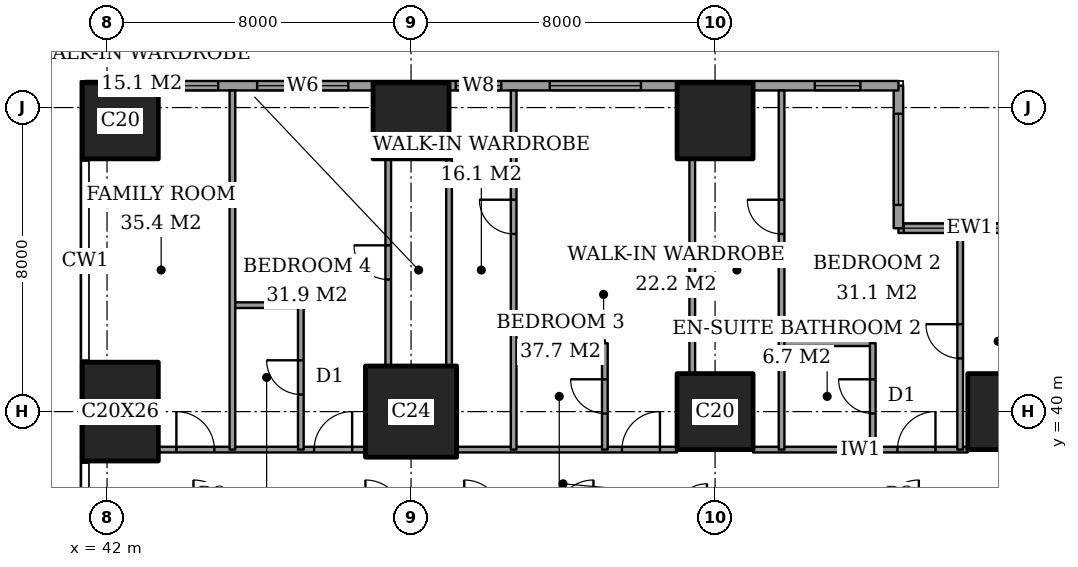
"""IFC4 building model, lengths in metres.
Left out: names, types, materials, properties, quantities, classifications, styles, units other than length and angle.
Written with IfcOpenShell. Run it as: python <this file> out.ifc"""

import sys

from ifc_helpers import new_model, si_unit, direction, frame, frame_2d, origin, origin_2d, place, context, subcontext, project, spatial, rectangle, extrude, element, fill, save


model = new_model("IFC4")
c1 = context("Model", 3, precision=1e-05, world=origin(), true_north=direction((0.0, 1.0)))
c2 = subcontext(c1, "Body", "Model", "MODEL_VIEW")
j1 = project(units=[si_unit("LENGTHUNIT", "METRE"), si_unit("PLANEANGLEUNIT", "RADIAN")], contexts=[c1])
p1 = place(None, origin())
s1 = spatial("IfcSite", under=j1, at=p1, CompositionType="ELEMENT")
p2 = place(p1, origin())
s2 = spatial("IfcBuilding", under=s1, at=p2, CompositionType="ELEMENT")
p3 = place(p2, frame((0.0, 0.0, 58.4)))
s3 = spatial("IfcBuildingStorey", under=s2, at=p3, CompositionType="ELEMENT", Elevation=58.4)
p4 = place(p3, frame((42.35, 40.0, 0.0), z_axis=(0.0, 0.0, 1.0), x_axis=(1.0, 0.0, 0.0)))
e1 = element("IfcColumn", 1, at=p4, inside=s3, PredefinedType="COLUMN", context=c2, shape_type="SweptSolid", body=[
    extrude(rectangle(XDim=2.0, YDim=2.6, at=origin_2d()), origin(), (0.0, 0.0, 1.0), 3.6),
])
p5 = place(p3, frame((42.35, 47.65, 0.0), z_axis=(0.0, 0.0, 1.0), x_axis=(1.0, 0.0, 0.0)))
e2 = element("IfcColumn", 2, at=p5, inside=s3, PredefinedType="COLUMN", context=c2, shape_type="SweptSolid", body=[
    extrude(rectangle(XDim=2.0, YDim=2.0, at=origin_2d()), origin(), (0.0, 0.0, 1.0), 3.6),
])
p6 = place(p3, frame((50.0, 40.0, 0.0), z_axis=(0.0, 0.0, 1.0), x_axis=(1.0, 0.0, 0.0)))
e3 = element("IfcColumn", 3, at=p6, inside=s3, PredefinedType="COLUMN", context=c2, shape_type="SweptSolid", body=[
    extrude(rectangle(XDim=2.4, YDim=2.4, at=origin_2d()), origin(), (0.0, 0.0, 1.0), 3.6),
])
for number, where, z_axis, x_axis in (
    (4, (50.0, 47.65, 0.0), (0.0, 0.0, 1.0), (1.0, 0.0, 0.0)),
    (5, (58.0, 40.0, 0.0), (0.0, 0.0, 1.0), (1.0, 0.0, 0.0)),
    (6, (58.0, 47.65, 0.0), (0.0, 0.0, 1.0), (1.0, 0.0, 0.0)),
    (7, (65.65, 40.0, 0.0), (0.0, 0.0, 1.0), (1.0, 0.0, 0.0)),
):
    element("IfcColumn", number, at=place(p3, frame(where, z_axis=z_axis, x_axis=x_axis)), inside=s3, PredefinedType="COLUMN", context=c2, shape_type="SweptSolid", body=[
        extrude(rectangle(XDim=2.0, YDim=2.0, at=origin_2d()), origin(), (0.0, 0.0, 1.0), 3.6),
    ])
p7 = place(p3, frame((66.575, 44.825, 0.0), z_axis=(0.0, 0.0, 1.0), x_axis=(-1.0, 0.0, 0.0)))
e8 = element("IfcWall", 8, at=p7, inside=s3, PredefinedType="SOLIDWALL", context=c2, shape_type="SweptSolid", body=[
    extrude(rectangle(XDim=3.75, YDim=0.25, at=frame_2d((1.875, 0.0))), origin(), (0.0, 0.0, 1.0), 3.6),
])
p8 = place(p7, frame((0.525, 0.0, 0.6)))
e9 = element("IfcOpeningElement", 9, at=p8, cuts=e8, PredefinedType="OPENING", context=c2, shape_type="SweptSolid", body=[
    extrude(rectangle(XDim=1.2, YDim=2.0, at=frame_2d((0.6, 1.0))), frame((0.0, 0.135, 0.0), z_axis=(0.0, -1.0, 0.0), x_axis=(1.0, 0.0, 0.0)), (0.0, 0.0, 1.0), 0.27),
])
p9 = place(p7, frame((2.413, 0.0, 0.6)))
e10 = element("IfcOpeningElement", 10, at=p9, cuts=e8, PredefinedType="OPENING", context=c2, shape_type="SweptSolid", body=[
    extrude(rectangle(XDim=1.2, YDim=2.0, at=frame_2d((0.6, 1.0))), frame((0.0, 0.135, 0.0), z_axis=(0.0, -1.0, 0.0), x_axis=(1.0, 0.0, 0.0)), (0.0, 0.0, 1.0), 0.27),
])
p10 = place(p3, frame((62.825, 44.825, 0.0), z_axis=(0.0, 0.0, 1.0), x_axis=(0.0, 1.0, 0.0)))
e11 = element("IfcWall", 11, at=p10, inside=s3, PredefinedType="SOLIDWALL", context=c2, shape_type="SweptSolid", body=[
    extrude(rectangle(XDim=3.75, YDim=0.25, at=frame_2d((1.875, 0.0))), origin(), (0.0, 0.0, 1.0), 3.6),
])
p11 = place(p10, frame((0.613, 0.0, 0.6)))
e12 = element("IfcOpeningElement", 12, at=p11, cuts=e11, PredefinedType="OPENING", context=c2, shape_type="SweptSolid", body=[
    extrude(rectangle(XDim=2.4, YDim=2.0, at=frame_2d((1.2, 1.0))), frame((0.0, 0.135, 0.0), z_axis=(0.0, -1.0, 0.0), x_axis=(1.0, 0.0, 0.0)), (0.0, 0.0, 1.0), 0.27),
])
p12 = place(p3, frame((62.825, 48.575, 0.0), z_axis=(0.0, 0.0, 1.0), x_axis=(-1.0, 0.0, 0.0)))
e13 = element("IfcWall", 13, at=p12, inside=s3, PredefinedType="SOLIDWALL", context=c2, shape_type="SweptSolid", body=[
    extrude(rectangle(XDim=21.4, YDim=0.25, at=frame_2d((10.7, 0.0))), origin(), (0.0, 0.0, 1.0), 3.6),
])
p13 = place(p12, frame((1.0, 0.0, 0.6)))
e14 = element("IfcOpeningElement", 14, at=p13, cuts=e13, PredefinedType="OPENING", context=c2, shape_type="SweptSolid", body=[
    extrude(rectangle(XDim=1.2, YDim=2.0, at=frame_2d((0.6, 1.0))), frame((0.0, 0.135, 0.0), z_axis=(0.0, -1.0, 0.0), x_axis=(1.0, 0.0, 0.0)), (0.0, 0.0, 1.0), 0.27),
])
p14 = place(p12, frame((6.775, 0.0, 0.6)))
e15 = element("IfcOpeningElement", 15, at=p14, cuts=e13, PredefinedType="OPENING", context=c2, shape_type="SweptSolid", body=[
    extrude(rectangle(XDim=2.4, YDim=2.0, at=frame_2d((1.2, 1.0))), frame((0.0, 0.135, 0.0), z_axis=(0.0, -1.0, 0.0), x_axis=(1.0, 0.0, 0.0)), (0.0, 0.0, 1.0), 0.27),
])
p15 = place(p12, frame((10.45, 0.0, 0.6)))
e16 = element("IfcOpeningElement", 16, at=p15, cuts=e13, PredefinedType="OPENING", context=c2, shape_type="SweptSolid", body=[
    extrude(rectangle(XDim=1.2, YDim=2.0, at=frame_2d((0.6, 1.0))), frame((0.0, 0.135, 0.0), z_axis=(0.0, -1.0, 0.0), x_axis=(1.0, 0.0, 0.0)), (0.0, 0.0, 1.0), 0.27),
])
p16 = place(p12, frame((14.475, 0.0, 0.6)))
e17 = element("IfcOpeningElement", 17, at=p16, cuts=e13, PredefinedType="OPENING", context=c2, shape_type="SweptSolid", body=[
    extrude(rectangle(XDim=2.4, YDim=2.0, at=frame_2d((1.2, 1.0))), frame((0.0, 0.135, 0.0), z_axis=(0.0, -1.0, 0.0), x_axis=(1.0, 0.0, 0.0)), (0.0, 0.0, 1.0), 0.27),
])
p17 = place(p12, frame((17.9, 0.0, 0.6)))
e18 = element("IfcOpeningElement", 18, at=p17, cuts=e13, PredefinedType="OPENING", context=c2, shape_type="SweptSolid", body=[
    extrude(rectangle(XDim=1.2, YDim=2.0, at=frame_2d((0.6, 1.0))), frame((0.0, 0.135, 0.0), z_axis=(0.0, -1.0, 0.0), x_axis=(1.0, 0.0, 0.0)), (0.0, 0.0, 1.0), 0.27),
])
p18 = place(p3, frame((43.35, 39.0, 0.0), z_axis=(0.0, 0.0, 1.0), x_axis=(1.0, 0.0, 0.0)))
e19 = element("IfcWall", 19, at=p18, inside=s3, PredefinedType="PARTITIONING", context=c2, shape_type="SweptSolid", body=[
    extrude(rectangle(XDim=5.45, YDim=0.15, at=frame_2d((2.725, 0.0))), origin(), (0.0, 0.0, 1.0), 3.35),
])
p19 = place(p18, frame((4.1, 0.0, 0.0)))
e20 = element("IfcOpeningElement", 20, at=p19, cuts=e19, PredefinedType="OPENING", context=c2, shape_type="SweptSolid", body=[
    extrude(rectangle(XDim=1.0, YDim=2.1, at=frame_2d((0.5, 1.05))), frame((0.0, 0.085, 0.0), z_axis=(0.0, -1.0, 0.0), x_axis=(1.0, 0.0, 0.0)), (0.0, 0.0, 1.0), 0.17),
])
p20 = place(p18, frame((0.475, 0.0, 0.0)))
e21 = element("IfcOpeningElement", 21, at=p20, cuts=e19, PredefinedType="OPENING", context=c2, shape_type="SweptSolid", body=[
    extrude(rectangle(XDim=1.0, YDim=2.1, at=frame_2d((0.5, 1.05))), frame((0.0, 0.085, 0.0), z_axis=(0.0, -1.0, 0.0), x_axis=(1.0, 0.0, 0.0)), (0.0, 0.0, 1.0), 0.17),
])
p21 = place(p3, frame((51.2, 39.0, 0.0), z_axis=(0.0, 0.0, 1.0), x_axis=(1.0, 0.0, 0.0)))
e22 = element("IfcWall", 22, at=p21, inside=s3, PredefinedType="PARTITIONING", context=c2, shape_type="SweptSolid", body=[
    extrude(rectangle(XDim=5.8, YDim=0.15, at=frame_2d((2.9, 0.0))), origin(), (0.0, 0.0, 1.0), 3.35),
])
p22 = place(p21, frame((4.35, 0.0, 0.0)))
e23 = element("IfcOpeningElement", 23, at=p22, cuts=e22, PredefinedType="OPENING", context=c2, shape_type="SweptSolid", body=[
    extrude(rectangle(XDim=1.0, YDim=2.1, at=frame_2d((0.5, 1.05))), frame((0.0, 0.085, 0.0), z_axis=(0.0, -1.0, 0.0), x_axis=(1.0, 0.0, 0.0)), (0.0, 0.0, 1.0), 0.17),
])
p23 = place(p3, frame((59.0, 39.0, 0.0), z_axis=(0.0, 0.0, 1.0), x_axis=(1.0, 0.0, 0.0)))
e24 = element("IfcWall", 24, at=p23, inside=s3, PredefinedType="PARTITIONING", context=c2, shape_type="SweptSolid", body=[
    extrude(rectangle(XDim=5.65, YDim=0.15, at=frame_2d((2.825, 0.0))), origin(), (0.0, 0.0, 1.0), 3.35),
])
p24 = place(p23, frame((3.8, 0.0, 0.0)))
e25 = element("IfcOpeningElement", 25, at=p24, cuts=e24, PredefinedType="OPENING", context=c2, shape_type="SweptSolid", body=[
    extrude(rectangle(XDim=1.0, YDim=2.1, at=frame_2d((0.5, 1.05))), frame((0.0, 0.085, 0.0), z_axis=(0.0, -1.0, 0.0), x_axis=(1.0, 0.0, 0.0)), (0.0, 0.0, 1.0), 0.17),
])
p25 = place(p3, frame((52.7, 41.8, 0.0), z_axis=(0.0, 0.0, 1.0), x_axis=(1.0, 0.0, 0.0)))
e26 = element("IfcWall", 26, at=p25, inside=s3, PredefinedType="PARTITIONING", context=c2, shape_type="SweptSolid", body=[
    extrude(rectangle(XDim=2.4, YDim=0.15, at=frame_2d((1.2, 0.0))), origin(), (0.0, 0.0, 1.0), 3.35),
])
p26 = place(p3, frame((59.75, 41.8, 0.0), z_axis=(0.0, 0.0, 1.0), x_axis=(1.0, 0.0, 0.0)))
e27 = element("IfcWall", 27, at=p26, inside=s3, PredefinedType="PARTITIONING", context=c2, shape_type="SweptSolid", body=[
    extrude(rectangle(XDim=2.4, YDim=0.15, at=frame_2d((1.2, 0.0))), origin(), (0.0, 0.0, 1.0), 3.35),
])
p27 = place(p3, frame((45.3, 42.8, 0.0), z_axis=(0.0, 0.0, 1.0), x_axis=(1.0, 0.0, 0.0)))
e28 = element("IfcWall", 28, at=p27, inside=s3, PredefinedType="PARTITIONING", context=c2, shape_type="SweptSolid", body=[
    extrude(rectangle(XDim=1.8, YDim=0.15, at=frame_2d((0.9, 0.0))), origin(), (0.0, 0.0, 1.0), 3.35),
])
p28 = place(p3, frame((45.3, 39.0, 0.0), z_axis=(0.0, 0.0, 1.0), x_axis=(0.0, 1.0, 0.0)))
e29 = element("IfcWall", 29, at=p28, inside=s3, PredefinedType="PARTITIONING", context=c2, shape_type="SweptSolid", body=[
    extrude(rectangle(XDim=9.45, YDim=0.15, at=frame_2d((4.725, 0.0))), origin(), (0.0, 0.0, 1.0), 3.35),
])
p29 = place(p3, frame((47.1, 39.0, 0.0), z_axis=(0.0, 0.0, 1.0), x_axis=(0.0, 1.0, 0.0)))
e30 = element("IfcWall", 30, at=p29, inside=s3, PredefinedType="PARTITIONING", context=c2, shape_type="SweptSolid", body=[
    extrude(rectangle(XDim=3.8, YDim=0.15, at=frame_2d((1.9, 0.0))), origin(), (0.0, 0.0, 1.0), 3.35),
])
p30 = place(p29, frame((1.45, 0.0, 0.0)))
e31 = element("IfcOpeningElement", 31, at=p30, cuts=e30, PredefinedType="OPENING", context=c2, shape_type="SweptSolid", body=[
    extrude(rectangle(XDim=0.9, YDim=2.1, at=frame_2d((0.45, 1.05))), frame((0.0, 0.085, 0.0), z_axis=(0.0, -1.0, 0.0), x_axis=(1.0, 0.0, 0.0)), (0.0, 0.0, 1.0), 0.17),
])
p31 = place(p3, frame((49.4, 41.2, 0.0), z_axis=(0.0, 0.0, 1.0), x_axis=(0.0, 1.0, 0.0)))
e32 = element("IfcWall", 32, at=p31, inside=s3, PredefinedType="PARTITIONING", context=c2, shape_type="SweptSolid", body=[
    extrude(rectangle(XDim=5.45, YDim=0.15, at=frame_2d((2.725, 0.0))), origin(), (0.0, 0.0, 1.0), 3.35),
])
p32 = place(p31, frame((2.275, 0.0, 0.0)))
e33 = element("IfcOpeningElement", 33, at=p32, cuts=e32, PredefinedType="OPENING", context=c2, shape_type="SweptSolid", body=[
    extrude(rectangle(XDim=0.9, YDim=2.1, at=frame_2d((0.45, 1.05))), frame((0.0, 0.085, 0.0), z_axis=(0.0, -1.0, 0.0), x_axis=(1.0, 0.0, 0.0)), (0.0, 0.0, 1.0), 0.17),
])
p33 = place(p3, frame((51.0, 41.2, 0.0), z_axis=(0.0, 0.0, 1.0), x_axis=(0.0, 1.0, 0.0)))
e34 = element("IfcWall", 34, at=p33, inside=s3, PredefinedType="PARTITIONING", context=c2, shape_type="SweptSolid", body=[
    extrude(rectangle(XDim=5.45, YDim=0.15, at=frame_2d((2.725, 0.0))), origin(), (0.0, 0.0, 1.0), 3.35),
])
p34 = place(p3, frame((52.7, 39.0, 0.0), z_axis=(0.0, 0.0, 1.0), x_axis=(0.0, 1.0, 0.0)))
e35 = element("IfcWall", 35, at=p34, inside=s3, PredefinedType="PARTITIONING", context=c2, shape_type="SweptSolid", body=[
    extrude(rectangle(XDim=9.45, YDim=0.15, at=frame_2d((4.725, 0.0))), origin(), (0.0, 0.0, 1.0), 3.35),
])
p35 = place(p34, frame((5.675, 0.0, 0.0)))
e36 = element("IfcOpeningElement", 36, at=p35, cuts=e35, PredefinedType="OPENING", context=c2, shape_type="SweptSolid", body=[
    extrude(rectangle(XDim=0.9, YDim=2.1, at=frame_2d((0.45, 1.05))), frame((0.0, 0.085, 0.0), z_axis=(0.0, -1.0, 0.0), x_axis=(1.0, 0.0, 0.0)), (0.0, 0.0, 1.0), 0.17),
])
p36 = place(p3, frame((55.1, 39.0, 0.0), z_axis=(0.0, 0.0, 1.0), x_axis=(0.0, 1.0, 0.0)))
e37 = element("IfcWall", 37, at=p36, inside=s3, PredefinedType="PARTITIONING", context=c2, shape_type="SweptSolid", body=[
    extrude(rectangle(XDim=2.8, YDim=0.15, at=frame_2d((1.4, 0.0))), origin(), (0.0, 0.0, 1.0), 3.35),
])
p37 = place(p36, frame((0.95, 0.0, 0.0)))
e38 = element("IfcOpeningElement", 38, at=p37, cuts=e37, PredefinedType="OPENING", context=c2, shape_type="SweptSolid", body=[
    extrude(rectangle(XDim=0.9, YDim=2.1, at=frame_2d((0.45, 1.05))), frame((0.0, 0.085, 0.0), z_axis=(0.0, -1.0, 0.0), x_axis=(1.0, 0.0, 0.0)), (0.0, 0.0, 1.0), 0.17),
])
p38 = place(p3, frame((57.4, 41.0, 0.0), z_axis=(0.0, 0.0, 1.0), x_axis=(0.0, 1.0, 0.0)))
e39 = element("IfcWall", 39, at=p38, inside=s3, PredefinedType="PARTITIONING", context=c2, shape_type="SweptSolid", body=[
    extrude(rectangle(XDim=5.65, YDim=0.15, at=frame_2d((2.825, 0.0))), origin(), (0.0, 0.0, 1.0), 3.35),
])
p39 = place(p3, frame((59.75, 39.0, 0.0), z_axis=(0.0, 0.0, 1.0), x_axis=(0.0, 1.0, 0.0)))
e40 = element("IfcWall", 40, at=p39, inside=s3, PredefinedType="PARTITIONING", context=c2, shape_type="SweptSolid", body=[
    extrude(rectangle(XDim=9.45, YDim=0.15, at=frame_2d((4.725, 0.0))), origin(), (0.0, 0.0, 1.0), 3.35),
])
p40 = place(p39, frame((5.675, 0.0, 0.0)))
e41 = element("IfcOpeningElement", 41, at=p40, cuts=e40, PredefinedType="OPENING", context=c2, shape_type="SweptSolid", body=[
    extrude(rectangle(XDim=0.9, YDim=2.1, at=frame_2d((0.45, 1.05))), frame((0.0, 0.085, 0.0), z_axis=(0.0, -1.0, 0.0), x_axis=(1.0, 0.0, 0.0)), (0.0, 0.0, 1.0), 0.17),
])
p41 = place(p3, frame((62.15, 39.0, 0.0), z_axis=(0.0, 0.0, 1.0), x_axis=(0.0, 1.0, 0.0)))
e42 = element("IfcWall", 42, at=p41, inside=s3, PredefinedType="PARTITIONING", context=c2, shape_type="SweptSolid", body=[
    extrude(rectangle(XDim=2.8, YDim=0.15, at=frame_2d((1.4, 0.0))), origin(), (0.0, 0.0, 1.0), 3.35),
])
p42 = place(p41, frame((0.95, 0.0, 0.0)))
e43 = element("IfcOpeningElement", 43, at=p42, cuts=e42, PredefinedType="OPENING", context=c2, shape_type="SweptSolid", body=[
    extrude(rectangle(XDim=0.9, YDim=2.1, at=frame_2d((0.45, 1.05))), frame((0.0, 0.085, 0.0), z_axis=(0.0, -1.0, 0.0), x_axis=(1.0, 0.0, 0.0)), (0.0, 0.0, 1.0), 0.17),
])
p43 = place(p3, frame((64.45, 39.0, 0.0), z_axis=(0.0, 0.0, 1.0), x_axis=(0.0, 1.0, 0.0)))
e44 = element("IfcWall", 44, at=p43, inside=s3, PredefinedType="PARTITIONING", context=c2, shape_type="SweptSolid", body=[
    extrude(rectangle(XDim=5.7, YDim=0.15, at=frame_2d((2.85, 0.0))), origin(), (0.0, 0.0, 1.0), 3.35),
])
p44 = place(p43, frame((2.4, 0.0, 0.0)))
e45 = element("IfcOpeningElement", 45, at=p44, cuts=e44, PredefinedType="OPENING", context=c2, shape_type="SweptSolid", body=[
    extrude(rectangle(XDim=0.9, YDim=2.1, at=frame_2d((0.45, 1.05))), frame((0.0, 0.085, 0.0), z_axis=(0.0, -1.0, 0.0), x_axis=(1.0, 0.0, 0.0)), (0.0, 0.0, 1.0), 0.17),
])
p45 = place(p8, origin())
e46 = element("IfcWindow", 46, at=p45, inside=s3, PartitioningType="SINGLE_PANEL", PredefinedType="WINDOW", context=c2, shape_type="SweptSolid", body=[
    extrude(rectangle(XDim=1.2, YDim=2.0, at=frame_2d((0.6, 1.0))), frame((0.0, 0.03, 0.0), z_axis=(0.0, -1.0, 0.0), x_axis=(1.0, 0.0, 0.0)), (0.0, 0.0, 1.0), 0.06),
])
fill(e9, e46)
p46 = place(p9, origin())
e47 = element("IfcWindow", 47, at=p46, inside=s3, PartitioningType="SINGLE_PANEL", PredefinedType="WINDOW", context=c2, shape_type="SweptSolid", body=[
    extrude(rectangle(XDim=1.2, YDim=2.0, at=frame_2d((0.6, 1.0))), frame((0.0, 0.03, 0.0), z_axis=(0.0, -1.0, 0.0), x_axis=(1.0, 0.0, 0.0)), (0.0, 0.0, 1.0), 0.06),
])
fill(e10, e47)
p47 = place(p11, origin())
e48 = element("IfcWindow", 48, at=p47, inside=s3, PartitioningType="SINGLE_PANEL", PredefinedType="WINDOW", context=c2, shape_type="SweptSolid", body=[
    extrude(rectangle(XDim=2.4, YDim=2.0, at=frame_2d((1.2, 1.0))), frame((0.0, 0.03, 0.0), z_axis=(0.0, -1.0, 0.0), x_axis=(1.0, 0.0, 0.0)), (0.0, 0.0, 1.0), 0.06),
])
fill(e12, e48)
p48 = place(p13, origin())
e49 = element("IfcWindow", 49, at=p48, inside=s3, PartitioningType="SINGLE_PANEL", PredefinedType="WINDOW", context=c2, shape_type="SweptSolid", body=[
    extrude(rectangle(XDim=1.2, YDim=2.0, at=frame_2d((0.6, 1.0))), frame((0.0, 0.03, 0.0), z_axis=(0.0, -1.0, 0.0), x_axis=(1.0, 0.0, 0.0)), (0.0, 0.0, 1.0), 0.06),
])
fill(e14, e49)
p49 = place(p14, origin())
e50 = element("IfcWindow", 50, at=p49, inside=s3, PartitioningType="SINGLE_PANEL", PredefinedType="WINDOW", context=c2, shape_type="SweptSolid", body=[
    extrude(rectangle(XDim=2.4, YDim=2.0, at=frame_2d((1.2, 1.0))), frame((0.0, 0.03, 0.0), z_axis=(0.0, -1.0, 0.0), x_axis=(1.0, 0.0, 0.0)), (0.0, 0.0, 1.0), 0.06),
])
fill(e15, e50)
p50 = place(p15, origin())
e51 = element("IfcWindow", 51, at=p50, inside=s3, PartitioningType="SINGLE_PANEL", PredefinedType="WINDOW", context=c2, shape_type="SweptSolid", body=[
    extrude(rectangle(XDim=1.2, YDim=2.0, at=frame_2d((0.6, 1.0))), frame((0.0, 0.03, 0.0), z_axis=(0.0, -1.0, 0.0), x_axis=(1.0, 0.0, 0.0)), (0.0, 0.0, 1.0), 0.06),
])
fill(e16, e51)
p51 = place(p16, origin())
e52 = element("IfcWindow", 52, at=p51, inside=s3, PartitioningType="SINGLE_PANEL", PredefinedType="WINDOW", context=c2, shape_type="SweptSolid", body=[
    extrude(rectangle(XDim=2.4, YDim=2.0, at=frame_2d((1.2, 1.0))), frame((0.0, 0.03, 0.0), z_axis=(0.0, -1.0, 0.0), x_axis=(1.0, 0.0, 0.0)), (0.0, 0.0, 1.0), 0.06),
])
fill(e17, e52)
p52 = place(p17, origin())
e53 = element("IfcWindow", 53, at=p52, inside=s3, PartitioningType="SINGLE_PANEL", PredefinedType="WINDOW", context=c2, shape_type="SweptSolid", body=[
    extrude(rectangle(XDim=1.2, YDim=2.0, at=frame_2d((0.6, 1.0))), frame((0.0, 0.03, 0.0), z_axis=(0.0, -1.0, 0.0), x_axis=(1.0, 0.0, 0.0)), (0.0, 0.0, 1.0), 0.06),
])
fill(e18, e53)
p53 = place(p44, origin())
e54 = element("IfcDoor", 54, at=p53, inside=s3, OperationType="SINGLE_SWING_LEFT", PredefinedType="DOOR", context=c2, shape_type="SweptSolid", body=[
    extrude(rectangle(XDim=0.9, YDim=2.1, at=frame_2d((0.45, 1.05))), frame((0.0, 0.025, 0.0), z_axis=(0.0, -1.0, 0.0), x_axis=(1.0, 0.0, 0.0)), (0.0, 0.0, 1.0), 0.05),
])
fill(e45, e54)
p54 = place(p42, origin())
e55 = element("IfcDoor", 55, at=p54, inside=s3, OperationType="SINGLE_SWING_LEFT", PredefinedType="DOOR", context=c2, shape_type="SweptSolid", body=[
    extrude(rectangle(XDim=0.9, YDim=2.1, at=frame_2d((0.45, 1.05))), frame((0.0, 0.025, 0.0), z_axis=(0.0, -1.0, 0.0), x_axis=(1.0, 0.0, 0.0)), (0.0, 0.0, 1.0), 0.05),
])
fill(e43, e55)
p55 = place(p24, origin())
e56 = element("IfcDoor", 56, at=p55, inside=s3, OperationType="SINGLE_SWING_LEFT", PredefinedType="DOOR", context=c2, shape_type="SweptSolid", body=[
    extrude(rectangle(XDim=1.0, YDim=2.1, at=frame_2d((0.5, 1.05))), frame((0.0, 0.025, 0.0), z_axis=(0.0, -1.0, 0.0), x_axis=(1.0, 0.0, 0.0)), (0.0, 0.0, 1.0), 0.05),
])
fill(e25, e56)
p56 = place(p40, origin())
e57 = element("IfcDoor", 57, at=p56, inside=s3, OperationType="SINGLE_SWING_LEFT", PredefinedType="DOOR", context=c2, shape_type="SweptSolid", body=[
    extrude(rectangle(XDim=0.9, YDim=2.1, at=frame_2d((0.45, 1.05))), frame((0.0, 0.025, 0.0), z_axis=(0.0, -1.0, 0.0), x_axis=(1.0, 0.0, 0.0)), (0.0, 0.0, 1.0), 0.05),
])
fill(e41, e57)
p57 = place(p37, origin())
e58 = element("IfcDoor", 58, at=p57, inside=s3, OperationType="SINGLE_SWING_LEFT", PredefinedType="DOOR", context=c2, shape_type="SweptSolid", body=[
    extrude(rectangle(XDim=0.9, YDim=2.1, at=frame_2d((0.45, 1.05))), frame((0.0, 0.025, 0.0), z_axis=(0.0, -1.0, 0.0), x_axis=(1.0, 0.0, 0.0)), (0.0, 0.0, 1.0), 0.05),
])
fill(e38, e58)
p58 = place(p22, origin())
e59 = element("IfcDoor", 59, at=p58, inside=s3, OperationType="SINGLE_SWING_LEFT", PredefinedType="DOOR", context=c2, shape_type="SweptSolid", body=[
    extrude(rectangle(XDim=1.0, YDim=2.1, at=frame_2d((0.5, 1.05))), frame((0.0, 0.025, 0.0), z_axis=(0.0, -1.0, 0.0), x_axis=(1.0, 0.0, 0.0)), (0.0, 0.0, 1.0), 0.05),
])
fill(e23, e59)
p59 = place(p35, origin())
e60 = element("IfcDoor", 60, at=p59, inside=s3, OperationType="SINGLE_SWING_LEFT", PredefinedType="DOOR", context=c2, shape_type="SweptSolid", body=[
    extrude(rectangle(XDim=0.9, YDim=2.1, at=frame_2d((0.45, 1.05))), frame((0.0, 0.025, 0.0), z_axis=(0.0, -1.0, 0.0), x_axis=(1.0, 0.0, 0.0)), (0.0, 0.0, 1.0), 0.05),
])
fill(e36, e60)
p60 = place(p32, origin())
e61 = element("IfcDoor", 61, at=p60, inside=s3, OperationType="SINGLE_SWING_LEFT", PredefinedType="DOOR", context=c2, shape_type="SweptSolid", body=[
    extrude(rectangle(XDim=0.9, YDim=2.1, at=frame_2d((0.45, 1.05))), frame((0.0, 0.025, 0.0), z_axis=(0.0, -1.0, 0.0), x_axis=(1.0, 0.0, 0.0)), (0.0, 0.0, 1.0), 0.05),
])
fill(e33, e61)
p61 = place(p30, origin())
e62 = element("IfcDoor", 62, at=p61, inside=s3, OperationType="SINGLE_SWING_LEFT", PredefinedType="DOOR", context=c2, shape_type="SweptSolid", body=[
    extrude(rectangle(XDim=0.9, YDim=2.1, at=frame_2d((0.45, 1.05))), frame((0.0, 0.025, 0.0), z_axis=(0.0, -1.0, 0.0), x_axis=(1.0, 0.0, 0.0)), (0.0, 0.0, 1.0), 0.05),
])
fill(e31, e62)
p62 = place(p19, origin())
e63 = element("IfcDoor", 63, at=p62, inside=s3, OperationType="SINGLE_SWING_LEFT", PredefinedType="DOOR", context=c2, shape_type="SweptSolid", body=[
    extrude(rectangle(XDim=1.0, YDim=2.1, at=frame_2d((0.5, 1.05))), frame((0.0, 0.025, 0.0), z_axis=(0.0, -1.0, 0.0), x_axis=(1.0, 0.0, 0.0)), (0.0, 0.0, 1.0), 0.05),
])
fill(e20, e63)
p63 = place(p20, origin())
e64 = element("IfcDoor", 64, at=p63, inside=s3, OperationType="SINGLE_SWING_RIGHT", PredefinedType="DOOR", context=c2, shape_type="SweptSolid", body=[
    extrude(rectangle(XDim=1.0, YDim=2.1, at=frame_2d((0.5, 1.05))), frame((0.0, 0.025, 0.0), z_axis=(0.0, -1.0, 0.0), x_axis=(1.0, 0.0, 0.0)), (0.0, 0.0, 1.0), 0.05),
])
fill(e21, e64)
save(model, sys.argv[1])
